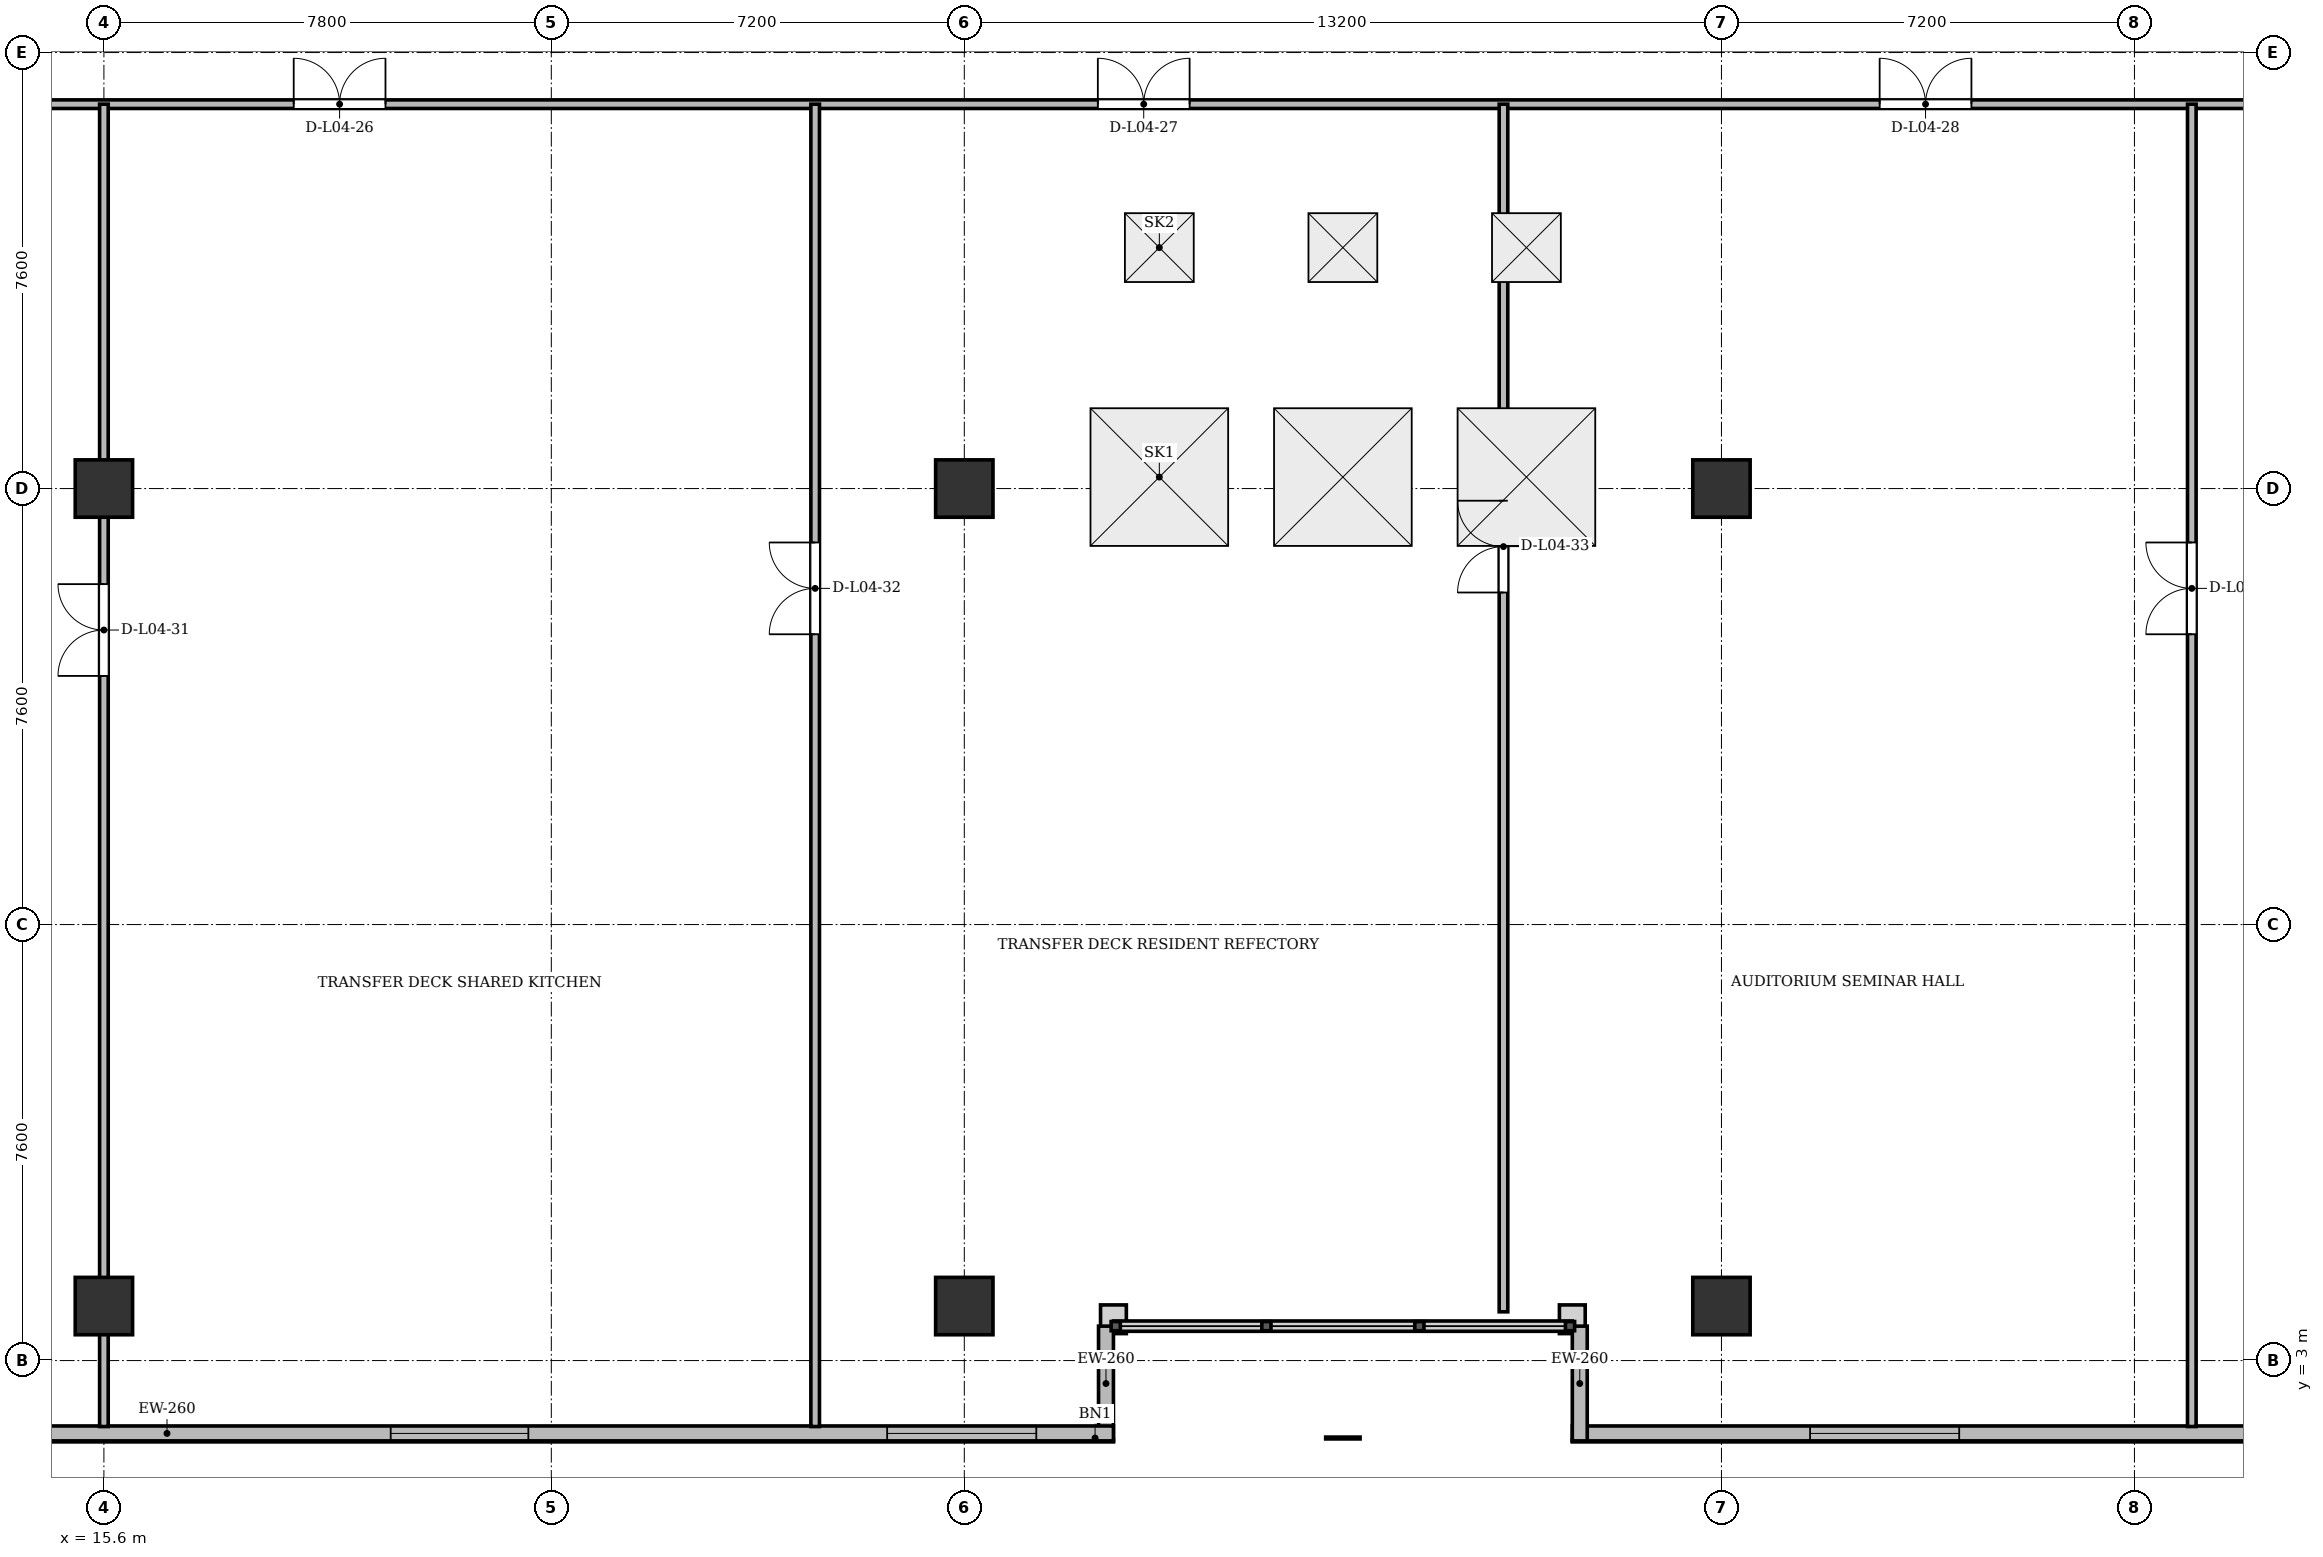
"""IFC4 building model, lengths in metres.
Left out: names, types, materials, properties, quantities, classifications, styles, units other than length and angle.
Written with IfcOpenShell. Run it as: python <this file> out.ifc"""

import sys

from ifc_helpers import new_model, si_unit, direction, frame, frame_2d, origin, origin_2d, place, context, subcontext, project, spatial, rectangle, extrude, source, transform, mapped, element, fill, save


model = new_model("IFC4")
c1 = context("Model", 3, precision=1e-05, world=origin(), true_north=direction((0.0, 1.0)))
c2 = subcontext(c1, "Body", "Model", "MODEL_VIEW")
j1 = project(units=[si_unit("LENGTHUNIT", "METRE"), si_unit("PLANEANGLEUNIT", "RADIAN")], contexts=[c1])
p1 = place(None, origin())
s1 = spatial("IfcSite", under=j1, at=p1, CompositionType="ELEMENT")
p2 = place(p1, origin())
s2 = spatial("IfcBuilding", under=s1, at=p2, CompositionType="ELEMENT")
p3 = place(p2, frame((0.0, 0.0, 18.7)))
s3 = spatial("IfcBuildingStorey", under=s2, at=p3, CompositionType="ELEMENT", Elevation=18.7)
m1 = source(origin(), c2, "Body", "SweptSolid", [
    extrude(rectangle(XDim=1.0, YDim=1.0, at=origin_2d()), origin(), (0.0, 0.0, 1.0), 4.8),
])
for number, where, z_axis, x_axis in (
    (1, (15.6, 3.95, 0.0), (0.0, 0.0, 1.0), (1.0, 0.0, 0.0)),
    (2, (15.6, 18.2, 0.0), (0.0, 0.0, 1.0), (1.0, 0.0, 0.0)),
    (3, (30.6, 3.95, 0.0), (0.0, 0.0, 1.0), (1.0, 0.0, 0.0)),
    (4, (30.6, 18.2, 0.0), (0.0, 0.0, 1.0), (1.0, 0.0, 0.0)),
    (5, (43.8, 3.95, 0.0), (0.0, 0.0, 1.0), (1.0, 0.0, 0.0)),
    (6, (43.8, 18.2, 0.0), (0.0, 0.0, 1.0), (1.0, 0.0, 0.0)),
):
    element("IfcColumn", number, at=place(p3, frame(where, z_axis=z_axis, x_axis=x_axis)), inside=s3, PredefinedType="COLUMN", context=c2, shape_type="MappedRepresentation", body=[
        mapped(m1, transform((0.0, 0.0, 0.0), x_axis=(1.0, 0.0, 0.0), y_axis=(0.0, 1.0, 0.0), z_axis=(0.0, 0.0, 1.0), scale=1.0)),
    ])
p4 = place(p3, frame((74.2, 1.73, 0.0), z_axis=(0.0, 0.0, 1.0), x_axis=(-1.0, 0.0, 0.0)))
e7 = element("IfcWall", 7, at=p4, inside=s3, PredefinedType="SOLIDWALL", context=c2, shape_type="SweptSolid", body=[
    extrude(rectangle(XDim=33.0, YDim=0.26, at=frame_2d((16.5, 0.0))), origin(), (0.0, 0.0, 1.0), 4.42),
])
p5 = place(p4, frame((5.095, 0.0, 0.9)))
e8 = element("IfcOpeningElement", 8, at=p5, cuts=e7, PredefinedType="OPENING", context=c2, shape_type="SweptSolid", body=[
    extrude(rectangle(XDim=2.6, YDim=1.9, at=frame_2d((1.3, 0.95))), frame((0.0, 0.14, 0.0), z_axis=(0.0, -1.0, 0.0), x_axis=(1.0, 0.0, 0.0)), (0.0, 0.0, 1.0), 0.28),
])
p6 = place(p4, frame((16.25, 0.0, 0.9)))
e9 = element("IfcOpeningElement", 9, at=p6, cuts=e7, PredefinedType="OPENING", context=c2, shape_type="SweptSolid", body=[
    extrude(rectangle(XDim=2.4, YDim=2.1, at=frame_2d((1.2, 1.05))), frame((0.0, 0.14, 0.0), z_axis=(0.0, -1.0, 0.0), x_axis=(1.0, 0.0, 0.0)), (0.0, 0.0, 1.0), 0.28),
])
p7 = place(p4, frame((26.255, 0.0, 0.9)))
e10 = element("IfcOpeningElement", 10, at=p7, cuts=e7, PredefinedType="OPENING", context=c2, shape_type="SweptSolid", body=[
    extrude(rectangle(XDim=2.6, YDim=1.9, at=frame_2d((1.3, 0.95))), frame((0.0, 0.14, 0.0), z_axis=(0.0, -1.0, 0.0), x_axis=(1.0, 0.0, 0.0)), (0.0, 0.0, 1.0), 0.28),
])
for number, where, z_axis, x_axis in (
    (11, (41.33, 1.6, 0.0), (0.0, 0.0, 1.0), (0.0, 1.0, 0.0)),
    (12, (33.07, 3.6, 0.0), (0.0, 0.0, 1.0), (0.0, -1.0, 0.0)),
):
    element("IfcWall", number, at=place(p3, frame(where, z_axis=z_axis, x_axis=x_axis)), inside=s3, PredefinedType="SOLIDWALL", context=c2, shape_type="SweptSolid", body=[
        extrude(rectangle(XDim=2.0, YDim=0.26, at=frame_2d((1.0, 0.0))), origin(), (0.0, 0.0, 1.0), 4.42),
    ])
p8 = place(p3, frame((33.2, 1.73, 0.0), z_axis=(0.0, 0.0, 1.0), x_axis=(-1.0, 0.0, 0.0)))
e13 = element("IfcWall", 13, at=p8, inside=s3, PredefinedType="SOLIDWALL", context=c2, shape_type="SweptSolid", body=[
    extrude(rectangle(XDim=33.0, YDim=0.26, at=frame_2d((16.5, 0.0))), origin(), (0.0, 0.0, 1.0), 4.42),
])
p9 = place(p8, frame((1.345, 0.0, 0.9)))
e14 = element("IfcOpeningElement", 14, at=p9, cuts=e13, PredefinedType="OPENING", context=c2, shape_type="SweptSolid", body=[
    extrude(rectangle(XDim=2.6, YDim=1.9, at=frame_2d((1.3, 0.95))), frame((0.0, 0.14, 0.0), z_axis=(0.0, -1.0, 0.0), x_axis=(1.0, 0.0, 0.0)), (0.0, 0.0, 1.0), 0.28),
])
p10 = place(p8, frame((10.2, 0.0, 0.9)))
e15 = element("IfcOpeningElement", 15, at=p10, cuts=e13, PredefinedType="OPENING", context=c2, shape_type="SweptSolid", body=[
    extrude(rectangle(XDim=2.4, YDim=2.1, at=frame_2d((1.2, 1.05))), frame((0.0, 0.14, 0.0), z_axis=(0.0, -1.0, 0.0), x_axis=(1.0, 0.0, 0.0)), (0.0, 0.0, 1.0), 0.28),
])
p11 = place(p8, frame((23.955, 0.0, 0.9)))
e16 = element("IfcOpeningElement", 16, at=p11, cuts=e13, PredefinedType="OPENING", context=c2, shape_type="SweptSolid", body=[
    extrude(rectangle(XDim=2.6, YDim=1.9, at=frame_2d((1.3, 0.95))), frame((0.0, 0.14, 0.0), z_axis=(0.0, -1.0, 0.0), x_axis=(1.0, 0.0, 0.0)), (0.0, 0.0, 1.0), 0.28),
])
p12 = place(p3, frame((0.45, 24.9, 0.0), z_axis=(0.0, 0.0, 1.0), x_axis=(1.0, 0.0, 0.0)))
e17 = element("IfcWall", 17, at=p12, inside=s3, PredefinedType="PARTITIONING", context=c2, shape_type="SweptSolid", body=[
    extrude(rectangle(XDim=73.5, YDim=0.15, at=frame_2d((36.75, 0.0))), origin(), (0.0, 0.0, 1.0), 2.92),
])
p13 = place(p12, frame((1.765, 0.0, 0.0)))
e18 = element("IfcOpeningElement", 18, at=p13, cuts=e17, PredefinedType="OPENING", context=c2, shape_type="SweptSolid", body=[
    extrude(rectangle(XDim=1.6, YDim=2.2, at=frame_2d((0.8, 1.1))), frame((0.0, 0.085, 0.0), z_axis=(0.0, -1.0, 0.0), x_axis=(1.0, 0.0, 0.0)), (0.0, 0.0, 1.0), 0.17),
])
p14 = place(p12, frame((18.459, 0.0, 0.0)))
e19 = element("IfcOpeningElement", 19, at=p14, cuts=e17, PredefinedType="OPENING", context=c2, shape_type="SweptSolid", body=[
    extrude(rectangle(XDim=1.6, YDim=2.2, at=frame_2d((0.8, 1.1))), frame((0.0, 0.085, 0.0), z_axis=(0.0, -1.0, 0.0), x_axis=(1.0, 0.0, 0.0)), (0.0, 0.0, 1.0), 0.17),
])
p15 = place(p12, frame((32.478, 0.0, 0.0)))
e20 = element("IfcOpeningElement", 20, at=p15, cuts=e17, PredefinedType="OPENING", context=c2, shape_type="SweptSolid", body=[
    extrude(rectangle(XDim=1.6, YDim=2.2, at=frame_2d((0.8, 1.1))), frame((0.0, 0.085, 0.0), z_axis=(0.0, -1.0, 0.0), x_axis=(1.0, 0.0, 0.0)), (0.0, 0.0, 1.0), 0.17),
])
p16 = place(p12, frame((46.108, 0.0, 0.0)))
e21 = element("IfcOpeningElement", 21, at=p16, cuts=e17, PredefinedType="OPENING", context=c2, shape_type="SweptSolid", body=[
    extrude(rectangle(XDim=1.6, YDim=2.2, at=frame_2d((0.8, 1.1))), frame((0.0, 0.085, 0.0), z_axis=(0.0, -1.0, 0.0), x_axis=(1.0, 0.0, 0.0)), (0.0, 0.0, 1.0), 0.17),
])
p17 = place(p12, frame((57.594, 0.0, 0.0)))
e22 = element("IfcOpeningElement", 22, at=p17, cuts=e17, PredefinedType="OPENING", context=c2, shape_type="SweptSolid", body=[
    extrude(rectangle(XDim=1.6, YDim=2.2, at=frame_2d((0.8, 1.1))), frame((0.0, 0.085, 0.0), z_axis=(0.0, -1.0, 0.0), x_axis=(1.0, 0.0, 0.0)), (0.0, 0.0, 1.0), 0.17),
])
p18 = place(p12, frame((70.676, 0.0, 0.0)))
e23 = element("IfcOpeningElement", 23, at=p18, cuts=e17, PredefinedType="OPENING", context=c2, shape_type="SweptSolid", body=[
    extrude(rectangle(XDim=1.6, YDim=2.2, at=frame_2d((0.8, 1.1))), frame((0.0, 0.085, 0.0), z_axis=(0.0, -1.0, 0.0), x_axis=(1.0, 0.0, 0.0)), (0.0, 0.0, 1.0), 0.17),
])
p19 = place(p3, frame((15.6, 1.85, 0.0), z_axis=(0.0, 0.0, 1.0), x_axis=(0.0, 1.0, 0.0)))
e24 = element("IfcWall", 24, at=p19, inside=s3, PredefinedType="PARTITIONING", context=c2, shape_type="SweptSolid", body=[
    extrude(rectangle(XDim=23.05, YDim=0.15, at=frame_2d((11.525, 0.0))), origin(), (0.0, 0.0, 1.0), 2.92),
])
p20 = place(p19, frame((13.084, 0.0, 0.0)))
e25 = element("IfcOpeningElement", 25, at=p20, cuts=e24, PredefinedType="OPENING", context=c2, shape_type="SweptSolid", body=[
    extrude(rectangle(XDim=1.6, YDim=2.2, at=frame_2d((0.8, 1.1))), frame((0.0, 0.085, 0.0), z_axis=(0.0, -1.0, 0.0), x_axis=(1.0, 0.0, 0.0)), (0.0, 0.0, 1.0), 0.17),
])
p21 = place(p3, frame((28.0, 1.85, 0.0), z_axis=(0.0, 0.0, 1.0), x_axis=(0.0, 1.0, 0.0)))
e26 = element("IfcWall", 26, at=p21, inside=s3, PredefinedType="PARTITIONING", context=c2, shape_type="SweptSolid", body=[
    extrude(rectangle(XDim=23.05, YDim=0.15, at=frame_2d((11.525, 0.0))), origin(), (0.0, 0.0, 1.0), 2.62),
])
p22 = place(p21, frame((13.81, 0.0, 0.0)))
e27 = element("IfcOpeningElement", 27, at=p22, cuts=e26, PredefinedType="OPENING", context=c2, shape_type="SweptSolid", body=[
    extrude(rectangle(XDim=1.6, YDim=2.2, at=frame_2d((0.8, 1.1))), frame((0.0, 0.085, 0.0), z_axis=(0.0, -1.0, 0.0), x_axis=(1.0, 0.0, 0.0)), (0.0, 0.0, 1.0), 0.17),
])
p23 = place(p3, frame((40.0, 3.85, 0.0), z_axis=(0.0, 0.0, 1.0), x_axis=(0.0, 1.0, 0.0)))
e28 = element("IfcWall", 28, at=p23, inside=s3, PredefinedType="PARTITIONING", context=c2, shape_type="SweptSolid", body=[
    extrude(rectangle(XDim=21.05, YDim=0.15, at=frame_2d((10.525, 0.0))), origin(), (0.0, 0.0, 1.0), 2.62),
])
p24 = place(p23, frame((12.538, 0.0, 0.0)))
e29 = element("IfcOpeningElement", 29, at=p24, cuts=e28, PredefinedType="OPENING", context=c2, shape_type="SweptSolid", body=[
    extrude(rectangle(XDim=1.6, YDim=2.2, at=frame_2d((0.8, 1.1))), frame((0.0, 0.085, 0.0), z_axis=(0.0, -1.0, 0.0), x_axis=(1.0, 0.0, 0.0)), (0.0, 0.0, 1.0), 0.17),
])
p25 = place(p3, frame((52.0, 1.85, 0.0), z_axis=(0.0, 0.0, 1.0), x_axis=(0.0, 1.0, 0.0)))
e30 = element("IfcWall", 30, at=p25, inside=s3, PredefinedType="PARTITIONING", context=c2, shape_type="SweptSolid", body=[
    extrude(rectangle(XDim=23.05, YDim=0.15, at=frame_2d((11.525, 0.0))), origin(), (0.0, 0.0, 1.0), 2.62),
])
p26 = place(p25, frame((13.81, 0.0, 0.0)))
e31 = element("IfcOpeningElement", 31, at=p26, cuts=e30, PredefinedType="OPENING", context=c2, shape_type="SweptSolid", body=[
    extrude(rectangle(XDim=1.6, YDim=2.2, at=frame_2d((0.8, 1.1))), frame((0.0, 0.085, 0.0), z_axis=(0.0, -1.0, 0.0), x_axis=(1.0, 0.0, 0.0)), (0.0, 0.0, 1.0), 0.17),
])
m2 = source(origin(), c2, "Body", "SweptSolid", [
    extrude(rectangle(XDim=2.6, YDim=1.9, at=frame_2d((1.3, 0.95))), frame((0.0, 0.03, 0.0), z_axis=(0.0, -1.0, 0.0), x_axis=(1.0, 0.0, 0.0)), (0.0, 0.0, 1.0), 0.06),
])
p27 = place(p7, origin())
e32 = element("IfcWindow", 32, at=p27, inside=s3, PartitioningType="SINGLE_PANEL", PredefinedType="WINDOW", context=c2, shape_type="MappedRepresentation", body=[
    mapped(m2, transform((0.0, 0.0, 0.0), x_axis=(1.0, 0.0, 0.0), y_axis=(0.0, 1.0, 0.0), z_axis=(0.0, 0.0, 1.0), scale=1.0)),
])
fill(e10, e32)
p28 = place(p9, origin())
e33 = element("IfcWindow", 33, at=p28, inside=s3, PartitioningType="SINGLE_PANEL", PredefinedType="WINDOW", context=c2, shape_type="MappedRepresentation", body=[
    mapped(m2, transform((0.0, 0.0, 0.0), x_axis=(1.0, 0.0, 0.0), y_axis=(0.0, 1.0, 0.0), z_axis=(0.0, 0.0, 1.0), scale=1.0)),
])
fill(e14, e33)
m3 = source(origin(), c2, "Body", "SweptSolid", [
    extrude(rectangle(XDim=2.4, YDim=2.1, at=frame_2d((1.2, 1.05))), frame((0.0, 0.03, 0.0), z_axis=(0.0, -1.0, 0.0), x_axis=(1.0, 0.0, 0.0)), (0.0, 0.0, 1.0), 0.06),
])
p29 = place(p10, origin())
e34 = element("IfcWindow", 34, at=p29, inside=s3, PartitioningType="SINGLE_PANEL", PredefinedType="WINDOW", context=c2, shape_type="MappedRepresentation", body=[
    mapped(m3, transform((0.0, 0.0, 0.0), x_axis=(1.0, 0.0, 0.0), y_axis=(0.0, 1.0, 0.0), z_axis=(0.0, 0.0, 1.0), scale=1.0)),
])
fill(e15, e34)
p30 = place(p3, frame((0.0, 0.0, -0.35)))
p31 = place(p30, frame((34.0, 18.4, 0.0)))
p32 = place(p31, frame((0.0, 0.0, 0.3)))
e35 = element("IfcWindow", 35, at=p32, inside=s3, PartitioningType="SINGLE_PANEL", PredefinedType="SKYLIGHT", context=c2, shape_type="SweptSolid", body=[
    extrude(rectangle(XDim=2.4, YDim=2.4, at=origin_2d()), origin(), (0.0, 0.0, 1.0), 0.05),
])
p33 = place(p30, frame((37.2, 18.4, 0.0)))
p34 = place(p33, frame((0.0, 0.0, 0.3)))
e36 = element("IfcWindow", 36, at=p34, inside=s3, PartitioningType="SINGLE_PANEL", PredefinedType="SKYLIGHT", context=c2, shape_type="SweptSolid", body=[
    extrude(rectangle(XDim=2.4, YDim=2.4, at=origin_2d()), origin(), (0.0, 0.0, 1.0), 0.05),
])
p35 = place(p30, frame((40.4, 18.4, 0.0)))
p36 = place(p35, frame((0.0, 0.0, 0.3)))
e37 = element("IfcWindow", 37, at=p36, inside=s3, PartitioningType="SINGLE_PANEL", PredefinedType="SKYLIGHT", context=c2, shape_type="SweptSolid", body=[
    extrude(rectangle(XDim=2.4, YDim=2.4, at=origin_2d()), origin(), (0.0, 0.0, 1.0), 0.05),
])
p37 = place(p30, frame((34.0, 22.4, 0.0)))
p38 = place(p37, frame((0.0, 0.0, 0.3)))
e38 = element("IfcWindow", 38, at=p38, inside=s3, PartitioningType="SINGLE_PANEL", PredefinedType="SKYLIGHT", context=c2, shape_type="SweptSolid", body=[
    extrude(rectangle(XDim=1.2, YDim=1.2, at=origin_2d()), origin(), (0.0, 0.0, 1.0), 0.05),
])
p39 = place(p30, frame((37.2, 22.4, 0.0)))
p40 = place(p39, frame((0.0, 0.0, 0.3)))
e39 = element("IfcWindow", 39, at=p40, inside=s3, PartitioningType="SINGLE_PANEL", PredefinedType="SKYLIGHT", context=c2, shape_type="SweptSolid", body=[
    extrude(rectangle(XDim=1.2, YDim=1.2, at=origin_2d()), origin(), (0.0, 0.0, 1.0), 0.05),
])
p41 = place(p30, frame((40.4, 22.4, 0.0)))
p42 = place(p41, frame((0.0, 0.0, 0.3)))
e40 = element("IfcWindow", 40, at=p42, inside=s3, PartitioningType="SINGLE_PANEL", PredefinedType="SKYLIGHT", context=c2, shape_type="SweptSolid", body=[
    extrude(rectangle(XDim=1.2, YDim=1.2, at=origin_2d()), origin(), (0.0, 0.0, 1.0), 0.05),
])
m4 = source(origin(), c2, "Body", "SweptSolid", [
    extrude(rectangle(XDim=1.6, YDim=2.2, at=frame_2d((0.8, 1.1))), frame((0.0, 0.025, 0.0), z_axis=(0.0, -1.0, 0.0), x_axis=(1.0, 0.0, 0.0)), (0.0, 0.0, 1.0), 0.05),
])
p43 = place(p14, origin())
e41 = element("IfcDoor", 41, at=p43, inside=s3, OperationType="DOUBLE_DOOR_SINGLE_SWING", PredefinedType="DOOR", context=c2, shape_type="MappedRepresentation", body=[
    mapped(m4, transform((0.0, 0.0, 0.0), x_axis=(1.0, 0.0, 0.0), y_axis=(0.0, 1.0, 0.0), z_axis=(0.0, 0.0, 1.0), scale=1.0)),
])
fill(e19, e41)
p44 = place(p15, origin())
e42 = element("IfcDoor", 42, at=p44, inside=s3, OperationType="DOUBLE_DOOR_SINGLE_SWING", PredefinedType="DOOR", context=c2, shape_type="MappedRepresentation", body=[
    mapped(m4, transform((0.0, 0.0, 0.0), x_axis=(1.0, 0.0, 0.0), y_axis=(0.0, 1.0, 0.0), z_axis=(0.0, 0.0, 1.0), scale=1.0)),
])
fill(e20, e42)
p45 = place(p16, origin())
e43 = element("IfcDoor", 43, at=p45, inside=s3, OperationType="DOUBLE_DOOR_SINGLE_SWING", PredefinedType="DOOR", context=c2, shape_type="MappedRepresentation", body=[
    mapped(m4, transform((0.0, 0.0, 0.0), x_axis=(1.0, 0.0, 0.0), y_axis=(0.0, 1.0, 0.0), z_axis=(0.0, 0.0, 1.0), scale=1.0)),
])
fill(e21, e43)
p46 = place(p20, origin())
e44 = element("IfcDoor", 44, at=p46, inside=s3, OperationType="DOUBLE_DOOR_SINGLE_SWING", PredefinedType="DOOR", context=c2, shape_type="MappedRepresentation", body=[
    mapped(m4, transform((0.0, 0.0, 0.0), x_axis=(1.0, 0.0, 0.0), y_axis=(0.0, 1.0, 0.0), z_axis=(0.0, 0.0, 1.0), scale=1.0)),
])
fill(e25, e44)
p47 = place(p22, origin())
e45 = element("IfcDoor", 45, at=p47, inside=s3, OperationType="DOUBLE_DOOR_SINGLE_SWING", PredefinedType="DOOR", context=c2, shape_type="MappedRepresentation", body=[
    mapped(m4, transform((0.0, 0.0, 0.0), x_axis=(1.0, 0.0, 0.0), y_axis=(0.0, 1.0, 0.0), z_axis=(0.0, 0.0, 1.0), scale=1.0)),
])
fill(e27, e45)
p48 = place(p24, origin())
e46 = element("IfcDoor", 46, at=p48, inside=s3, OperationType="DOUBLE_DOOR_SINGLE_SWING", PredefinedType="DOOR", context=c2, shape_type="MappedRepresentation", body=[
    mapped(m4, transform((0.0, 0.0, 0.0), x_axis=(1.0, 0.0, 0.0), y_axis=(0.0, 1.0, 0.0), z_axis=(0.0, 0.0, 1.0), scale=1.0)),
])
fill(e29, e46)
p49 = place(p26, origin())
e47 = element("IfcDoor", 47, at=p49, inside=s3, OperationType="DOUBLE_DOOR_SINGLE_SWING", PredefinedType="DOOR", context=c2, shape_type="MappedRepresentation", body=[
    mapped(m4, transform((0.0, 0.0, 0.0), x_axis=(1.0, 0.0, 0.0), y_axis=(0.0, 1.0, 0.0), z_axis=(0.0, 0.0, 1.0), scale=1.0)),
])
fill(e31, e47)
save(model, sys.argv[1])
